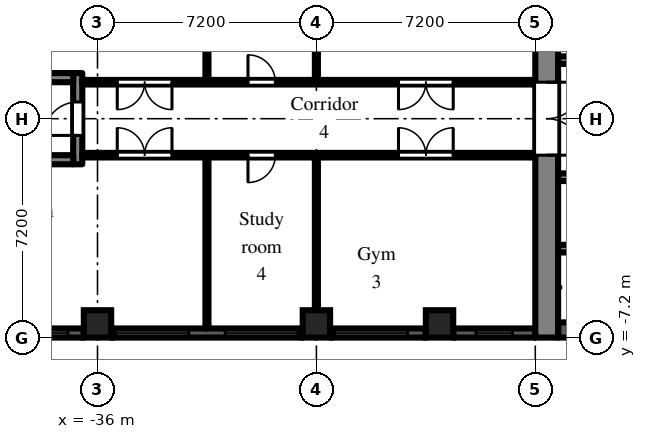
"""IFC4 building model, lengths in metres.
Left out: names, types, materials, properties, quantities, classifications, styles, units other than length and angle.
Written with IfcOpenShell. Run it as: python <this file> out.ifc"""

import sys

from ifc_helpers import new_model, si_unit, direction, frame, frame_2d, origin, origin_2d, place, context, subcontext, project, spatial, rectangle, extrude, element, fill, save


model = new_model("IFC4")
c1 = context("Model", 3, precision=1e-05, world=origin(), true_north=direction((0.0, 1.0)))
c2 = subcontext(c1, "Body", "Model", "MODEL_VIEW")
j1 = project(units=[si_unit("LENGTHUNIT", "METRE"), si_unit("PLANEANGLEUNIT", "RADIAN")], contexts=[c1])
p1 = place(None, origin())
s1 = spatial("IfcSite", under=j1, at=p1, CompositionType="ELEMENT")
p2 = place(p1, origin())
s2 = spatial("IfcBuilding", under=s1, at=p2, CompositionType="ELEMENT")
p3 = place(p2, frame((0.0, 0.0, 29.7)))
s3 = spatial("IfcBuildingStorey", under=s2, at=p3, CompositionType="ELEMENT", Elevation=29.7)
for number, where, z_axis, x_axis in (
    (1, (-36.0, -6.75, 0.0), (0.0, 0.0, 1.0), (1.0, 0.0, 0.0)),
    (2, (-28.8, -6.75, 0.0), (0.0, 0.0, 1.0), (1.0, 0.0, 0.0)),
    (3, (-24.75, -6.75, 0.0), (0.0, 0.0, 1.0), (1.0, 0.0, 0.0)),
):
    element("IfcColumn", number, at=place(p3, frame(where, z_axis=z_axis, x_axis=x_axis)), inside=s3, PredefinedType="COLUMN", context=c2, shape_type="SweptSolid", body=[
        extrude(rectangle(XDim=0.9, YDim=0.9, at=origin_2d()), origin(), (0.0, 0.0, 1.0), 3.0),
    ])
p4 = place(p3, frame((-38.7, -7.05, 0.0), z_axis=(0.0, 0.0, 1.0), x_axis=(1.0, 0.0, 0.0)))
e4 = element("IfcWall", 4, at=p4, inside=s3, PredefinedType="SOLIDWALL", context=c2, shape_type="SweptSolid", body=[
    extrude(rectangle(XDim=2.25, YDim=0.3, at=frame_2d((1.125, 0.0))), origin(), (0.0, 0.0, 1.0), 2.1),
])
p5 = place(p4, frame((0.525, 0.0, 0.2)))
e5 = element("IfcOpeningElement", 5, at=p5, cuts=e4, PredefinedType="OPENING", context=c2, shape_type="SweptSolid", body=[
    extrude(rectangle(XDim=1.2, YDim=1.85, at=frame_2d((0.6, 0.925))), frame((0.0, 0.16, 0.0), z_axis=(0.0, -1.0, 0.0), x_axis=(1.0, 0.0, 0.0)), (0.0, 0.0, 1.0), 0.32),
])
p6 = place(p3, frame((-35.55, -7.05, 0.0), z_axis=(0.0, 0.0, 1.0), x_axis=(1.0, 0.0, 0.0)))
e6 = element("IfcWall", 6, at=p6, inside=s3, PredefinedType="SOLIDWALL", context=c2, shape_type="SweptSolid", body=[
    extrude(rectangle(XDim=6.3, YDim=0.3, at=frame_2d((3.15, 0.0))), origin(), (0.0, 0.0, 1.0), 2.1),
])
p7 = place(p6, frame((0.15, 0.0, 0.2)))
e7 = element("IfcOpeningElement", 7, at=p7, cuts=e6, PredefinedType="OPENING", context=c2, shape_type="SweptSolid", body=[
    extrude(rectangle(XDim=2.4, YDim=1.85, at=frame_2d((1.2, 0.925))), frame((0.0, 0.16, 0.0), z_axis=(0.0, -1.0, 0.0), x_axis=(1.0, 0.0, 0.0)), (0.0, 0.0, 1.0), 0.32),
])
p8 = place(p6, frame((3.75, 0.0, 0.2)))
e8 = element("IfcOpeningElement", 8, at=p8, cuts=e6, PredefinedType="OPENING", context=c2, shape_type="SweptSolid", body=[
    extrude(rectangle(XDim=2.4, YDim=1.85, at=frame_2d((1.2, 0.925))), frame((0.0, 0.16, 0.0), z_axis=(0.0, -1.0, 0.0), x_axis=(1.0, 0.0, 0.0)), (0.0, 0.0, 1.0), 0.32),
])
p9 = place(p3, frame((-28.35, -7.05, 0.0), z_axis=(0.0, 0.0, 1.0), x_axis=(1.0, 0.0, 0.0)))
e9 = element("IfcWall", 9, at=p9, inside=s3, PredefinedType="SOLIDWALL", context=c2, shape_type="SweptSolid", body=[
    extrude(rectangle(XDim=3.15, YDim=0.3, at=frame_2d((1.575, 0.0))), origin(), (0.0, 0.0, 1.0), 2.1),
])
p10 = place(p9, frame((0.15, 0.0, 0.2)))
e10 = element("IfcOpeningElement", 10, at=p10, cuts=e9, PredefinedType="OPENING", context=c2, shape_type="SweptSolid", body=[
    extrude(rectangle(XDim=2.4, YDim=1.85, at=frame_2d((1.2, 0.925))), frame((0.0, 0.16, 0.0), z_axis=(0.0, -1.0, 0.0), x_axis=(1.0, 0.0, 0.0)), (0.0, 0.0, 1.0), 0.32),
])
p11 = place(p3, frame((-24.3, -7.05, 0.0), z_axis=(0.0, 0.0, 1.0), x_axis=(1.0, 0.0, 0.0)))
e11 = element("IfcWall", 11, at=p11, inside=s3, PredefinedType="SOLIDWALL", context=c2, shape_type="SweptSolid", body=[
    extrude(rectangle(XDim=2.7, YDim=0.3, at=frame_2d((1.35, 0.0))), origin(), (0.0, 0.0, 1.0), 2.1),
])
p12 = place(p11, frame((0.75, 0.0, 0.2)))
e12 = element("IfcOpeningElement", 12, at=p12, cuts=e11, PredefinedType="OPENING", context=c2, shape_type="SweptSolid", body=[
    extrude(rectangle(XDim=1.2, YDim=1.85, at=frame_2d((0.6, 0.925))), frame((0.0, 0.16, 0.0), z_axis=(0.0, -1.0, 0.0), x_axis=(1.0, 0.0, 0.0)), (0.0, 0.0, 1.0), 0.32),
])
p13 = place(p3, frame((-21.225, -7.2, 0.0), z_axis=(0.0, 0.0, 1.0), x_axis=(0.0, 1.0, 0.0)))
e13 = element("IfcWall", 13, at=p13, inside=s3, PredefinedType="SHEAR", context=c2, shape_type="SweptSolid", body=[
    extrude(rectangle(XDim=14.4, YDim=0.75, at=frame_2d((7.2, 0.0))), origin(), (0.0, 0.0, 1.0), 2.575),
])
p14 = place(p13, frame((6.0, 0.0, 0.0)))
e14 = element("IfcOpeningElement", 14, at=p14, cuts=e13, PredefinedType="OPENING", context=c2, shape_type="SweptSolid", body=[
    extrude(rectangle(XDim=2.4, YDim=2.2, at=frame_2d((1.2, 1.1))), frame((0.0, 0.385, 0.0), z_axis=(0.0, -1.0, 0.0), x_axis=(1.0, 0.0, 0.0)), (0.0, 0.0, 1.0), 0.77),
])
p15 = place(p3, frame((-7.9, 1.925, 0.0), z_axis=(0.0, 0.0, 1.0), x_axis=(-1.0, 0.0, 0.0)))
e15 = element("IfcWall", 15, at=p15, inside=s3, PredefinedType="SHEAR", context=c2, shape_type="SweptSolid", body=[
    extrude(rectangle(XDim=12.95, YDim=0.25, at=frame_2d((6.475, 0.0))), origin(), (0.0, 0.0, 1.0), 2.575),
])
p16 = place(p15, frame((0.525, 0.0, 0.0)))
e16 = element("IfcOpeningElement", 16, at=p16, cuts=e15, PredefinedType="OPENING", context=c2, shape_type="SweptSolid", body=[
    extrude(rectangle(XDim=0.9, YDim=2.1, at=frame_2d((0.45, 1.05))), frame((0.0, 0.135, 0.0), z_axis=(0.0, -1.0, 0.0), x_axis=(1.0, 0.0, 0.0)), (0.0, 0.0, 1.0), 0.27),
])
p17 = place(p15, frame((2.625, 0.0, 0.0)))
e17 = element("IfcOpeningElement", 17, at=p17, cuts=e15, PredefinedType="OPENING", context=c2, shape_type="SweptSolid", body=[
    extrude(rectangle(XDim=1.1, YDim=2.1, at=frame_2d((0.55, 1.05))), frame((0.0, 0.135, 0.0), z_axis=(0.0, -1.0, 0.0), x_axis=(1.0, 0.0, 0.0)), (0.0, 0.0, 1.0), 0.27),
])
p18 = place(p15, frame((6.025, 0.0, 0.0)))
e18 = element("IfcOpeningElement", 18, at=p18, cuts=e15, PredefinedType="OPENING", context=c2, shape_type="SweptSolid", body=[
    extrude(rectangle(XDim=0.9, YDim=2.1, at=frame_2d((0.45, 1.05))), frame((0.0, 0.135, 0.0), z_axis=(0.0, -1.0, 0.0), x_axis=(1.0, 0.0, 0.0)), (0.0, 0.0, 1.0), 0.27),
])
p19 = place(p15, frame((9.325, 0.0, 0.0)))
e19 = element("IfcOpeningElement", 19, at=p19, cuts=e15, PredefinedType="OPENING", context=c2, shape_type="SweptSolid", body=[
    extrude(rectangle(XDim=0.9, YDim=2.1, at=frame_2d((0.45, 1.05))), frame((0.0, 0.135, 0.0), z_axis=(0.0, -1.0, 0.0), x_axis=(1.0, 0.0, 0.0)), (0.0, 0.0, 1.0), 0.27),
])
p20 = place(p3, frame((-7.9, -6.95, 0.0), z_axis=(0.0, 0.0, 1.0), x_axis=(-1.0, 0.0, 0.0)))
e20 = element("IfcWall", 20, at=p20, inside=s3, PredefinedType="SHEAR", context=c2, shape_type="SweptSolid", body=[
    extrude(rectangle(XDim=12.95, YDim=0.5, at=frame_2d((6.475, 0.0))), origin(), (0.0, 0.0, 1.0), 2.575),
])
p21 = place(p3, frame((-7.9, -1.925, 0.0), z_axis=(0.0, 0.0, 1.0), x_axis=(-1.0, 0.0, 0.0)))
e21 = element("IfcWall", 21, at=p21, inside=s3, PredefinedType="SHEAR", context=c2, shape_type="SweptSolid", body=[
    extrude(rectangle(XDim=12.95, YDim=0.25, at=frame_2d((6.475, 0.0))), origin(), (0.0, 0.0, 1.0), 2.575),
])
p22 = place(p21, frame((4.825, 0.0, 0.0)))
e22 = element("IfcOpeningElement", 22, at=p22, cuts=e21, PredefinedType="OPENING", context=c2, shape_type="SweptSolid", body=[
    extrude(rectangle(XDim=1.1, YDim=2.1, at=frame_2d((0.55, 1.05))), frame((0.0, 0.135, 0.0), z_axis=(0.0, -1.0, 0.0), x_axis=(1.0, 0.0, 0.0)), (0.0, 0.0, 1.0), 0.27),
])
p23 = place(p21, frame((7.025, 0.0, 0.0)))
e23 = element("IfcOpeningElement", 23, at=p23, cuts=e21, PredefinedType="OPENING", context=c2, shape_type="SweptSolid", body=[
    extrude(rectangle(XDim=1.1, YDim=2.1, at=frame_2d((0.55, 1.05))), frame((0.0, 0.135, 0.0), z_axis=(0.0, -1.0, 0.0), x_axis=(1.0, 0.0, 0.0)), (0.0, 0.0, 1.0), 0.27),
])
p24 = place(p21, frame((9.225, 0.0, 0.0)))
e24 = element("IfcOpeningElement", 24, at=p24, cuts=e21, PredefinedType="OPENING", context=c2, shape_type="SweptSolid", body=[
    extrude(rectangle(XDim=1.1, YDim=2.1, at=frame_2d((0.55, 1.05))), frame((0.0, 0.135, 0.0), z_axis=(0.0, -1.0, 0.0), x_axis=(1.0, 0.0, 0.0)), (0.0, 0.0, 1.0), 0.27),
])
p25 = place(p21, frame((0.525, 0.0, 0.0)))
e25 = element("IfcOpeningElement", 25, at=p25, cuts=e21, PredefinedType="OPENING", context=c2, shape_type="SweptSolid", body=[
    extrude(rectangle(XDim=0.9, YDim=2.1, at=frame_2d((0.45, 1.05))), frame((0.0, 0.135, 0.0), z_axis=(0.0, -1.0, 0.0), x_axis=(1.0, 0.0, 0.0)), (0.0, 0.0, 1.0), 0.27),
])
p26 = place(p21, frame((2.625, 0.0, 0.0)))
e26 = element("IfcOpeningElement", 26, at=p26, cuts=e21, PredefinedType="OPENING", context=c2, shape_type="SweptSolid", body=[
    extrude(rectangle(XDim=1.1, YDim=2.1, at=frame_2d((0.55, 1.05))), frame((0.0, 0.135, 0.0), z_axis=(0.0, -1.0, 0.0), x_axis=(1.0, 0.0, 0.0)), (0.0, 0.0, 1.0), 0.27),
])
p27 = place(p3, frame((-12.3, -4.275, 0.0), z_axis=(0.0, 0.0, 1.0), x_axis=(-1.0, 0.0, 0.0)))
e27 = element("IfcWall", 27, at=p27, inside=s3, PredefinedType="SHEAR", context=c2, shape_type="SweptSolid", body=[
    extrude(rectangle(XDim=8.55, YDim=0.25, at=frame_2d((4.275, 0.0))), origin(), (0.0, 0.0, 1.0), 2.575),
])
p28 = place(p3, frame((-36.65, -1.5, 0.0), z_axis=(0.0, 0.0, 1.0), x_axis=(0.0, 1.0, 0.0)))
e28 = element("IfcWall", 28, at=p28, inside=s3, PredefinedType="SHEAR", context=c2, shape_type="SweptSolid", body=[
    extrude(rectangle(XDim=3.0, YDim=0.3, at=frame_2d((1.5, 0.0))), origin(), (0.0, 0.0, 1.0), 2.575),
])
p29 = place(p28, frame((0.95, 0.0, 0.0)))
e29 = element("IfcOpeningElement", 29, at=p29, cuts=e28, PredefinedType="OPENING", context=c2, shape_type="SweptSolid", body=[
    extrude(rectangle(XDim=1.1, YDim=2.1, at=frame_2d((0.55, 1.05))), frame((0.0, 0.16, 0.0), z_axis=(0.0, -1.0, 0.0), x_axis=(1.0, 0.0, 0.0)), (0.0, 0.0, 1.0), 0.32),
])
for number, where, z_axis, x_axis in (
    (30, (-36.8, -1.35, 0.0), (0.0, 0.0, 1.0), (-1.0, 0.0, 0.0)),
    (31, (-36.8, 1.35, 0.0), (0.0, 0.0, 1.0), (-1.0, 0.0, 0.0)),
):
    element("IfcWall", number, at=place(p3, frame(where, z_axis=z_axis, x_axis=x_axis)), inside=s3, PredefinedType="SHEAR", context=c2, shape_type="SweptSolid", body=[
        extrude(rectangle(XDim=5.8, YDim=0.3, at=frame_2d((2.9, 0.0))), origin(), (0.0, 0.0, 1.0), 2.575),
    ])
p30 = place(p3, frame((-36.5, -1.2, 0.0), z_axis=(0.0, 0.0, 1.0), x_axis=(1.0, 0.0, 0.0)))
e32 = element("IfcWall", 32, at=p30, inside=s3, PredefinedType="PARTITIONING", context=c2, shape_type="SweptSolid", body=[
    extrude(rectangle(XDim=14.9, YDim=0.15, at=frame_2d((7.45, 0.0))), origin(), (0.0, 0.0, 1.0), 2.575),
])
p31 = place(p30, frame((10.4, 0.0, 0.0)))
e33 = element("IfcOpeningElement", 33, at=p31, cuts=e32, PredefinedType="OPENING", context=c2, shape_type="SweptSolid", body=[
    extrude(rectangle(XDim=1.8, YDim=2.1, at=frame_2d((0.9, 1.05))), frame((0.0, 0.085, 0.0), z_axis=(0.0, -1.0, 0.0), x_axis=(1.0, 0.0, 0.0)), (0.0, 0.0, 1.0), 0.17),
])
p32 = place(p30, frame((5.45, 0.0, 0.0)))
e34 = element("IfcOpeningElement", 34, at=p32, cuts=e32, PredefinedType="OPENING", context=c2, shape_type="SweptSolid", body=[
    extrude(rectangle(XDim=0.9, YDim=2.1, at=frame_2d((0.45, 1.05))), frame((0.0, 0.085, 0.0), z_axis=(0.0, -1.0, 0.0), x_axis=(1.0, 0.0, 0.0)), (0.0, 0.0, 1.0), 0.17),
])
p33 = place(p30, frame((1.15, 0.0, 0.0)))
e35 = element("IfcOpeningElement", 35, at=p33, cuts=e32, PredefinedType="OPENING", context=c2, shape_type="SweptSolid", body=[
    extrude(rectangle(XDim=1.8, YDim=2.1, at=frame_2d((0.9, 1.05))), frame((0.0, 0.085, 0.0), z_axis=(0.0, -1.0, 0.0), x_axis=(1.0, 0.0, 0.0)), (0.0, 0.0, 1.0), 0.17),
])
p34 = place(p3, frame((-36.5, 1.2, 0.0), z_axis=(0.0, 0.0, 1.0), x_axis=(1.0, 0.0, 0.0)))
e36 = element("IfcWall", 36, at=p34, inside=s3, PredefinedType="PARTITIONING", context=c2, shape_type="SweptSolid", body=[
    extrude(rectangle(XDim=14.9, YDim=0.15, at=frame_2d((7.45, 0.0))), origin(), (0.0, 0.0, 1.0), 2.575),
])
p35 = place(p34, frame((10.4, 0.0, 0.0)))
e37 = element("IfcOpeningElement", 37, at=p35, cuts=e36, PredefinedType="OPENING", context=c2, shape_type="SweptSolid", body=[
    extrude(rectangle(XDim=1.8, YDim=2.1, at=frame_2d((0.9, 1.05))), frame((0.0, 0.085, 0.0), z_axis=(0.0, -1.0, 0.0), x_axis=(1.0, 0.0, 0.0)), (0.0, 0.0, 1.0), 0.17),
])
p36 = place(p34, frame((5.45, 0.0, 0.0)))
e38 = element("IfcOpeningElement", 38, at=p36, cuts=e36, PredefinedType="OPENING", context=c2, shape_type="SweptSolid", body=[
    extrude(rectangle(XDim=0.9, YDim=2.1, at=frame_2d((0.45, 1.05))), frame((0.0, 0.085, 0.0), z_axis=(0.0, -1.0, 0.0), x_axis=(1.0, 0.0, 0.0)), (0.0, 0.0, 1.0), 0.17),
])
p37 = place(p34, frame((1.15, 0.0, 0.0)))
e39 = element("IfcOpeningElement", 39, at=p37, cuts=e36, PredefinedType="OPENING", context=c2, shape_type="SweptSolid", body=[
    extrude(rectangle(XDim=1.8, YDim=2.1, at=frame_2d((0.9, 1.05))), frame((0.0, 0.085, 0.0), z_axis=(0.0, -1.0, 0.0), x_axis=(1.0, 0.0, 0.0)), (0.0, 0.0, 1.0), 0.17),
])
for number, where, z_axis, x_axis in (
    (40, (-32.4, -6.9, 0.0), (0.0, 0.0, 1.0), (0.0, 1.0, 0.0)),
    (41, (-32.4, 1.275, 0.0), (0.0, 0.0, 1.0), (0.0, 1.0, 0.0)),
    (42, (-28.8, -6.9, 0.0), (0.0, 0.0, 1.0), (0.0, 1.0, 0.0)),
    (43, (-28.8, 1.275, 0.0), (0.0, 0.0, 1.0), (0.0, 1.0, 0.0)),
):
    element("IfcWall", number, at=place(p3, frame(where, z_axis=z_axis, x_axis=x_axis)), inside=s3, PredefinedType="PARTITIONING", context=c2, shape_type="SweptSolid", body=[
        extrude(rectangle(XDim=5.625, YDim=0.1, at=frame_2d((2.812, 0.0))), origin(), (0.0, 0.0, 1.0), 2.575),
    ])
p38 = place(p5, origin())
e44 = element("IfcWindow", 44, at=p38, inside=s3, PartitioningType="SINGLE_PANEL", PredefinedType="WINDOW", context=c2, shape_type="SweptSolid", body=[
    extrude(rectangle(XDim=1.2, YDim=1.85, at=frame_2d((0.6, 0.925))), frame((0.0, 0.03, 0.0), z_axis=(0.0, -1.0, 0.0), x_axis=(1.0, 0.0, 0.0)), (0.0, 0.0, 1.0), 0.06),
])
fill(e5, e44)
p39 = place(p7, origin())
e45 = element("IfcWindow", 45, at=p39, inside=s3, PartitioningType="SINGLE_PANEL", PredefinedType="WINDOW", context=c2, shape_type="SweptSolid", body=[
    extrude(rectangle(XDim=2.4, YDim=1.85, at=frame_2d((1.2, 0.925))), frame((0.0, 0.03, 0.0), z_axis=(0.0, -1.0, 0.0), x_axis=(1.0, 0.0, 0.0)), (0.0, 0.0, 1.0), 0.06),
])
fill(e7, e45)
p40 = place(p8, origin())
e46 = element("IfcWindow", 46, at=p40, inside=s3, PartitioningType="SINGLE_PANEL", PredefinedType="WINDOW", context=c2, shape_type="SweptSolid", body=[
    extrude(rectangle(XDim=2.4, YDim=1.85, at=frame_2d((1.2, 0.925))), frame((0.0, 0.03, 0.0), z_axis=(0.0, -1.0, 0.0), x_axis=(1.0, 0.0, 0.0)), (0.0, 0.0, 1.0), 0.06),
])
fill(e8, e46)
p41 = place(p10, origin())
e47 = element("IfcWindow", 47, at=p41, inside=s3, PartitioningType="SINGLE_PANEL", PredefinedType="WINDOW", context=c2, shape_type="SweptSolid", body=[
    extrude(rectangle(XDim=2.4, YDim=1.85, at=frame_2d((1.2, 0.925))), frame((0.0, 0.03, 0.0), z_axis=(0.0, -1.0, 0.0), x_axis=(1.0, 0.0, 0.0)), (0.0, 0.0, 1.0), 0.06),
])
fill(e10, e47)
p42 = place(p12, origin())
e48 = element("IfcWindow", 48, at=p42, inside=s3, PartitioningType="SINGLE_PANEL", PredefinedType="WINDOW", context=c2, shape_type="SweptSolid", body=[
    extrude(rectangle(XDim=1.2, YDim=1.85, at=frame_2d((0.6, 0.925))), frame((0.0, 0.03, 0.0), z_axis=(0.0, -1.0, 0.0), x_axis=(1.0, 0.0, 0.0)), (0.0, 0.0, 1.0), 0.06),
])
fill(e12, e48)
p43 = place(p14, frame((2.4, 0.0, 0.0), z_axis=(0.0, 0.0, 1.0), x_axis=(-1.0, 0.0, 0.0)))
e49 = element("IfcDoor", 49, at=p43, inside=s3, OperationType="DOUBLE_DOOR_DOUBLE_SWING", PredefinedType="DOOR", context=c2, shape_type="SweptSolid", body=[
    extrude(rectangle(XDim=2.4, YDim=2.2, at=frame_2d((1.2, 1.1))), frame((0.0, 0.025, 0.0), z_axis=(0.0, -1.0, 0.0), x_axis=(1.0, 0.0, 0.0)), (0.0, 0.0, 1.0), 0.05),
])
fill(e14, e49)
p44 = place(p29, origin())
e50 = element("IfcDoor", 50, at=p44, inside=s3, OperationType="SINGLE_SWING_LEFT", PredefinedType="DOOR", context=c2, shape_type="SweptSolid", body=[
    extrude(rectangle(XDim=1.1, YDim=2.1, at=frame_2d((0.55, 1.05))), frame((0.0, 0.025, 0.0), z_axis=(0.0, -1.0, 0.0), x_axis=(1.0, 0.0, 0.0)), (0.0, 0.0, 1.0), 0.05),
])
fill(e29, e50)
p45 = place(p31, origin())
e51 = element("IfcDoor", 51, at=p45, inside=s3, OperationType="DOUBLE_DOOR_DOUBLE_SWING", PredefinedType="DOOR", context=c2, shape_type="SweptSolid", body=[
    extrude(rectangle(XDim=1.8, YDim=2.1, at=frame_2d((0.9, 1.05))), frame((0.0, 0.025, 0.0), z_axis=(0.0, -1.0, 0.0), x_axis=(1.0, 0.0, 0.0)), (0.0, 0.0, 1.0), 0.05),
])
fill(e33, e51)
p46 = place(p32, frame((0.9, 0.0, 0.0), z_axis=(0.0, 0.0, 1.0), x_axis=(-1.0, 0.0, 0.0)))
e52 = element("IfcDoor", 52, at=p46, inside=s3, OperationType="SINGLE_SWING_RIGHT", PredefinedType="DOOR", context=c2, shape_type="SweptSolid", body=[
    extrude(rectangle(XDim=0.9, YDim=2.1, at=frame_2d((0.45, 1.05))), frame((0.0, 0.025, 0.0), z_axis=(0.0, -1.0, 0.0), x_axis=(1.0, 0.0, 0.0)), (0.0, 0.0, 1.0), 0.05),
])
fill(e34, e52)
p47 = place(p33, origin())
e53 = element("IfcDoor", 53, at=p47, inside=s3, OperationType="DOUBLE_DOOR_DOUBLE_SWING", PredefinedType="DOOR", context=c2, shape_type="SweptSolid", body=[
    extrude(rectangle(XDim=1.8, YDim=2.1, at=frame_2d((0.9, 1.05))), frame((0.0, 0.025, 0.0), z_axis=(0.0, -1.0, 0.0), x_axis=(1.0, 0.0, 0.0)), (0.0, 0.0, 1.0), 0.05),
])
fill(e35, e53)
p48 = place(p35, frame((1.8, 0.0, 0.0), z_axis=(0.0, 0.0, 1.0), x_axis=(-1.0, 0.0, 0.0)))
e54 = element("IfcDoor", 54, at=p48, inside=s3, OperationType="DOUBLE_DOOR_DOUBLE_SWING", PredefinedType="DOOR", context=c2, shape_type="SweptSolid", body=[
    extrude(rectangle(XDim=1.8, YDim=2.1, at=frame_2d((0.9, 1.05))), frame((0.0, 0.025, 0.0), z_axis=(0.0, -1.0, 0.0), x_axis=(1.0, 0.0, 0.0)), (0.0, 0.0, 1.0), 0.05),
])
fill(e37, e54)
p49 = place(p36, origin())
e55 = element("IfcDoor", 55, at=p49, inside=s3, OperationType="SINGLE_SWING_LEFT", PredefinedType="DOOR", context=c2, shape_type="SweptSolid", body=[
    extrude(rectangle(XDim=0.9, YDim=2.1, at=frame_2d((0.45, 1.05))), frame((0.0, 0.025, 0.0), z_axis=(0.0, -1.0, 0.0), x_axis=(1.0, 0.0, 0.0)), (0.0, 0.0, 1.0), 0.05),
])
fill(e38, e55)
p50 = place(p37, frame((1.8, 0.0, 0.0), z_axis=(0.0, 0.0, 1.0), x_axis=(-1.0, 0.0, 0.0)))
e56 = element("IfcDoor", 56, at=p50, inside=s3, OperationType="DOUBLE_DOOR_DOUBLE_SWING", PredefinedType="DOOR", context=c2, shape_type="SweptSolid", body=[
    extrude(rectangle(XDim=1.8, YDim=2.1, at=frame_2d((0.9, 1.05))), frame((0.0, 0.025, 0.0), z_axis=(0.0, -1.0, 0.0), x_axis=(1.0, 0.0, 0.0)), (0.0, 0.0, 1.0), 0.05),
])
fill(e39, e56)
save(model, sys.argv[1])
